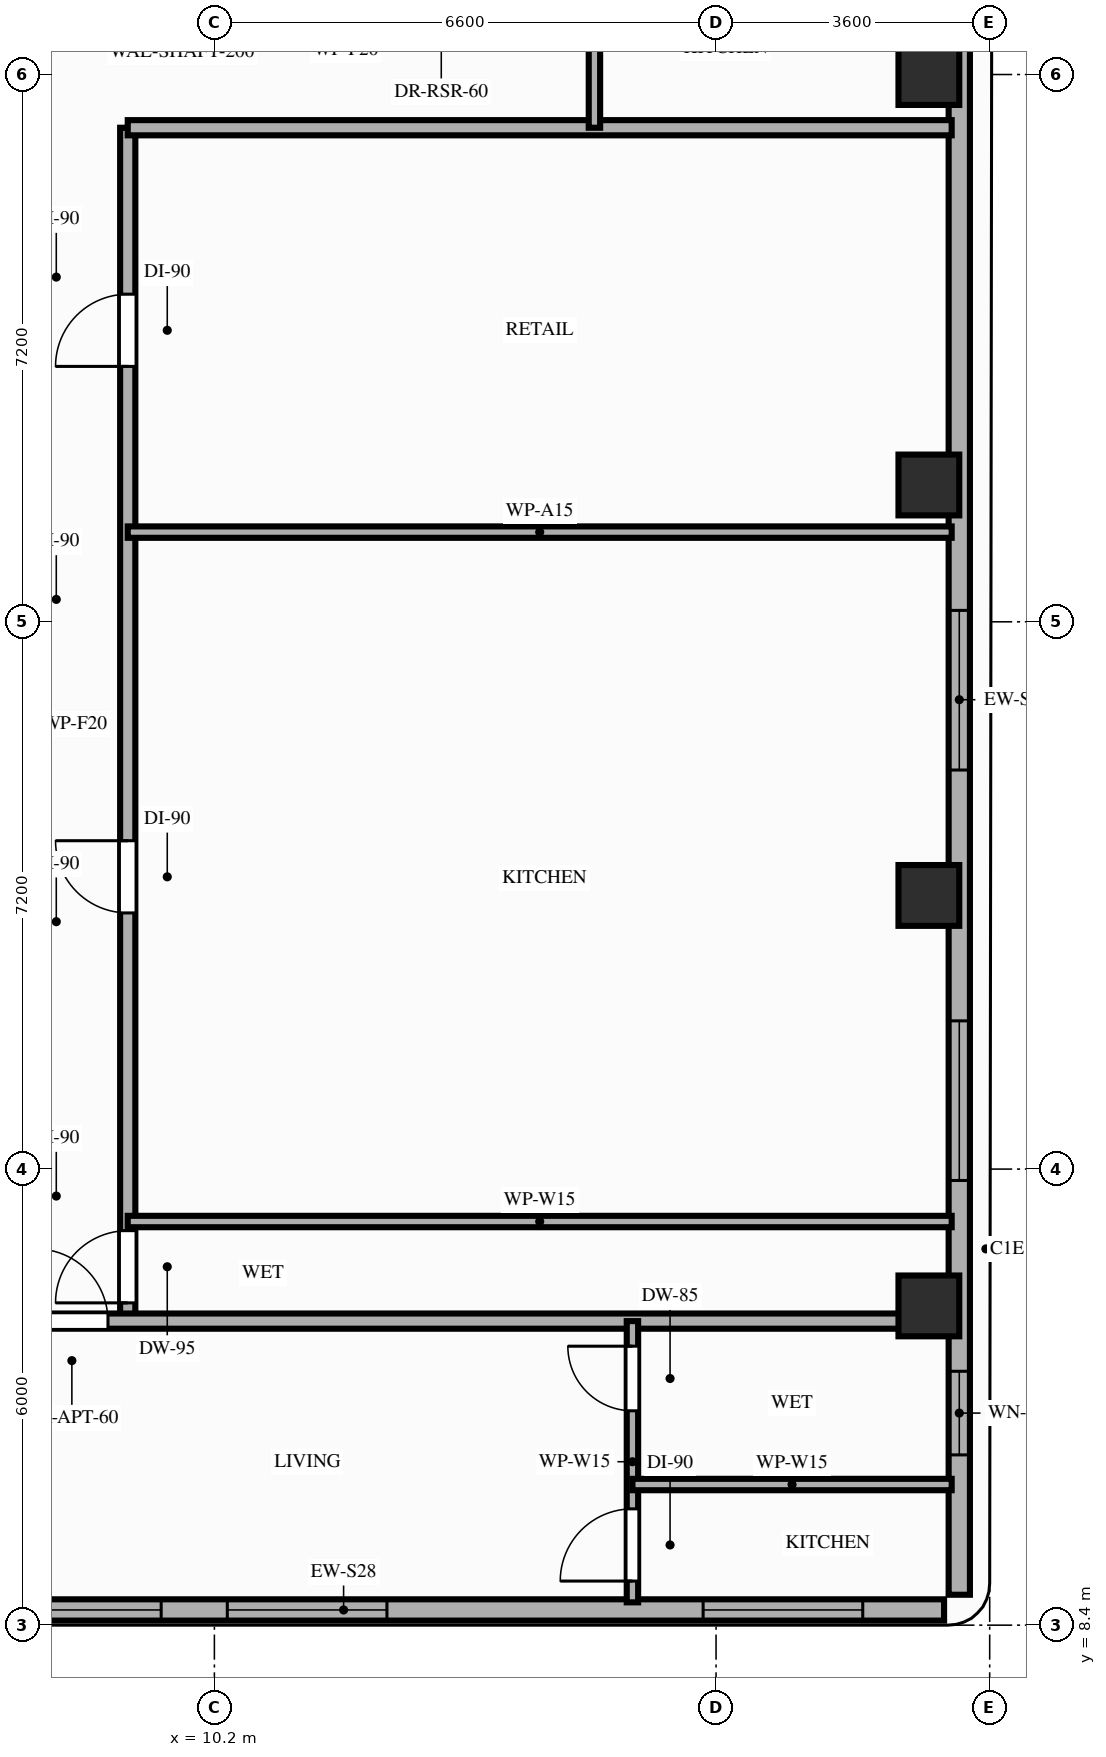
"""IFC4 building model, lengths in metres.
Left out: names, types, materials, properties, quantities, classifications, styles, units other than length and angle.
Written with IfcOpenShell. Run it as: python <this file> out.ifc"""

import sys

from ifc_helpers import new_model, si_unit, direction, frame, frame_2d, origin, origin_2d, place, context, subcontext, project, spatial, rectangle, extrude, element, fill, save


model = new_model("IFC4")
c1 = context("Model", 3, precision=1e-05, world=origin(), true_north=direction((0.0, 1.0)))
c2 = subcontext(c1, "Body", "Model", "MODEL_VIEW")
j1 = project(units=[si_unit("LENGTHUNIT", "METRE"), si_unit("PLANEANGLEUNIT", "RADIAN")], contexts=[c1])
p1 = place(None, origin())
s1 = spatial("IfcSite", under=j1, at=p1, CompositionType="ELEMENT")
p2 = place(p1, origin())
s2 = spatial("IfcBuilding", under=s1, at=p2, CompositionType="ELEMENT")
p3 = place(p2, frame((0.0, 0.0, 218.4)))
s3 = spatial("IfcBuildingStorey", under=s2, at=p3, CompositionType="ELEMENT", Elevation=218.4)
for number, where, z_axis, x_axis in (
    (1, (19.6, 12.6, 0.0), (0.0, 0.0, 1.0), (1.0, 0.0, 0.0)),
    (2, (19.6, 18.0, 0.0), (0.0, 0.0, 1.0), (1.0, 0.0, 0.0)),
    (3, (19.6, 23.4, 0.0), (0.0, 0.0, 1.0), (1.0, 0.0, 0.0)),
    (4, (19.6, 28.8, 0.0), (0.0, 0.0, 1.0), (1.0, 0.0, 0.0)),
):
    element("IfcColumn", number, at=place(p3, frame(where, z_axis=z_axis, x_axis=x_axis)), inside=s3, PredefinedType="COLUMN", context=c2, shape_type="SweptSolid", body=[
        extrude(rectangle(XDim=0.8, YDim=0.8, at=origin_2d()), origin(), (0.0, 0.0, 1.0), 3.2),
    ])
p4 = place(p3, frame((4.0, 8.6, 0.0), z_axis=(0.0, 0.0, 1.0), x_axis=(1.0, 0.0, 0.0)))
e5 = element("IfcWall", 5, at=p4, inside=s3, PredefinedType="STANDARD", context=c2, shape_type="SweptSolid", body=[
    extrude(rectangle(XDim=15.8, YDim=0.28, at=frame_2d((7.9, 0.0))), origin(), (0.0, 0.0, 1.0), 3.02),
])
p5 = place(p4, frame((6.37, 0.0, 0.85)))
e6 = element("IfcOpeningElement", 6, at=p5, cuts=e5, PredefinedType="OPENING", context=c2, shape_type="SweptSolid", body=[
    extrude(rectangle(XDim=2.1, YDim=1.8, at=frame_2d((1.05, 0.9))), frame((0.0, 0.15, 0.0), z_axis=(0.0, -1.0, 0.0), x_axis=(1.0, 0.0, 0.0)), (0.0, 0.0, 1.0), 0.3),
])
p6 = place(p4, frame((12.63, 0.0, 0.85)))
e7 = element("IfcOpeningElement", 7, at=p6, cuts=e5, PredefinedType="OPENING", context=c2, shape_type="SweptSolid", body=[
    extrude(rectangle(XDim=2.1, YDim=1.8, at=frame_2d((1.05, 0.9))), frame((0.0, 0.15, 0.0), z_axis=(0.0, -1.0, 0.0), x_axis=(1.0, 0.0, 0.0)), (0.0, 0.0, 1.0), 0.3),
])
p7 = place(p4, frame((3.4, 0.0, 0.85)))
e8 = element("IfcOpeningElement", 8, at=p7, cuts=e5, PredefinedType="OPENING", context=c2, shape_type="SweptSolid", body=[
    extrude(rectangle(XDim=2.1, YDim=1.8, at=frame_2d((1.05, 0.9))), frame((0.0, 0.15, 0.0), z_axis=(0.0, -1.0, 0.0), x_axis=(1.0, 0.0, 0.0)), (0.0, 0.0, 1.0), 0.3),
])
p8 = place(p3, frame((20.0, 8.8, 0.0), z_axis=(0.0, 0.0, 1.0), x_axis=(0.0, 1.0, 0.0)))
e9 = element("IfcWall", 9, at=p8, inside=s3, PredefinedType="STANDARD", context=c2, shape_type="SweptSolid", body=[
    extrude(rectangle(XDim=23.55, YDim=0.28, at=frame_2d((11.775, 0.0))), origin(), (0.0, 0.0, 1.0), 2.51),
])
p9 = place(p8, frame((1.84, 0.0, 0.85)))
e10 = element("IfcOpeningElement", 10, at=p9, cuts=e9, PredefinedType="OPENING", context=c2, shape_type="SweptSolid", body=[
    extrude(rectangle(XDim=1.1, YDim=1.41, at=frame_2d((0.55, 0.705))), frame((0.0, 0.15, 0.0), z_axis=(0.0, -1.0, 0.0), x_axis=(1.0, 0.0, 0.0)), (0.0, 0.0, 1.0), 0.3),
])
p10 = place(p8, frame((5.45, 0.0, 0.85)))
e11 = element("IfcOpeningElement", 11, at=p10, cuts=e9, PredefinedType="OPENING", context=c2, shape_type="SweptSolid", body=[
    extrude(rectangle(XDim=2.1, YDim=1.41, at=frame_2d((1.05, 0.705))), frame((0.0, 0.15, 0.0), z_axis=(0.0, -1.0, 0.0), x_axis=(1.0, 0.0, 0.0)), (0.0, 0.0, 1.0), 0.3),
])
p11 = place(p8, frame((10.85, 0.0, 0.85)))
e12 = element("IfcOpeningElement", 12, at=p11, cuts=e9, PredefinedType="OPENING", context=c2, shape_type="SweptSolid", body=[
    extrude(rectangle(XDim=2.1, YDim=1.41, at=frame_2d((1.05, 0.705))), frame((0.0, 0.15, 0.0), z_axis=(0.0, -1.0, 0.0), x_axis=(1.0, 0.0, 0.0)), (0.0, 0.0, 1.0), 0.3),
])
p12 = place(p3, frame((9.06, 12.4, 0.0), z_axis=(0.0, 0.0, 1.0), x_axis=(0.0, 1.0, 0.0)))
e13 = element("IfcWall", 13, at=p12, inside=s3, PredefinedType="PARTITIONING", context=c2, shape_type="SweptSolid", body=[
    extrude(rectangle(XDim=15.7, YDim=0.2, at=frame_2d((7.85, 0.0))), origin(), (0.0, 0.0, 1.0), 2.51),
])
p13 = place(p12, frame((0.24, 0.0, 0.0)))
e14 = element("IfcOpeningElement", 14, at=p13, cuts=e13, PredefinedType="OPENING", context=c2, shape_type="SweptSolid", body=[
    extrude(rectangle(XDim=0.95, YDim=2.1, at=frame_2d((0.475, 1.05))), frame((0.0, 0.11, 0.0), z_axis=(0.0, -1.0, 0.0), x_axis=(1.0, 0.0, 0.0)), (0.0, 0.0, 1.0), 0.22),
])
p14 = place(p12, frame((5.37, 0.0, 0.0)))
e15 = element("IfcOpeningElement", 15, at=p14, cuts=e13, PredefinedType="OPENING", context=c2, shape_type="SweptSolid", body=[
    extrude(rectangle(XDim=0.95, YDim=2.15, at=frame_2d((0.475, 1.075))), frame((0.0, 0.11, 0.0), z_axis=(0.0, -1.0, 0.0), x_axis=(1.0, 0.0, 0.0)), (0.0, 0.0, 1.0), 0.22),
])
p15 = place(p12, frame((12.56, 0.0, 0.0)))
e16 = element("IfcOpeningElement", 16, at=p15, cuts=e13, PredefinedType="OPENING", context=c2, shape_type="SweptSolid", body=[
    extrude(rectangle(XDim=0.95, YDim=2.15, at=frame_2d((0.475, 1.075))), frame((0.0, 0.11, 0.0), z_axis=(0.0, -1.0, 0.0), x_axis=(1.0, 0.0, 0.0)), (0.0, 0.0, 1.0), 0.22),
])
p16 = place(p3, frame((3.9, 12.4, 0.0), z_axis=(0.0, 0.0, 1.0), x_axis=(1.0, 0.0, 0.0)))
e17 = element("IfcWall", 17, at=p16, inside=s3, PredefinedType="PARTITIONING", context=c2, shape_type="SweptSolid", body=[
    extrude(rectangle(XDim=16.0, YDim=0.2, at=frame_2d((8.0, 0.0))), origin(), (0.0, 0.0, 1.0), 2.51),
])
p17 = place(p16, frame((3.95, 0.0, 0.0)))
e18 = element("IfcOpeningElement", 18, at=p17, cuts=e17, PredefinedType="OPENING", context=c2, shape_type="SweptSolid", body=[
    extrude(rectangle(XDim=0.95, YDim=2.15, at=frame_2d((0.475, 1.075))), frame((0.0, 0.11, 0.0), z_axis=(0.0, -1.0, 0.0), x_axis=(1.0, 0.0, 0.0)), (0.0, 0.0, 1.0), 0.22),
])
p18 = place(p3, frame((9.06, 28.1, 0.0), z_axis=(0.0, 0.0, 1.0), x_axis=(1.0, 0.0, 0.0)))
e19 = element("IfcWall", 19, at=p18, inside=s3, PredefinedType="PARTITIONING", context=c2, shape_type="SweptSolid", body=[
    extrude(rectangle(XDim=10.84, YDim=0.2, at=frame_2d((5.42, 0.0))), origin(), (0.0, 0.0, 1.0), 2.51),
])
p19 = place(p3, frame((15.2, 28.1, 0.0), z_axis=(0.0, 0.0, 1.0), x_axis=(0.0, 1.0, 0.0)))
e20 = element("IfcWall", 20, at=p19, inside=s3, PredefinedType="PARTITIONING", context=c2, shape_type="SweptSolid", body=[
    extrude(rectangle(XDim=3.05, YDim=0.15, at=frame_2d((1.525, 0.0))), origin(), (0.0, 0.0, 1.0), 2.51),
])
p20 = place(p3, frame((15.7, 8.7, 0.0), z_axis=(0.0, 0.0, 1.0), x_axis=(0.0, 1.0, 0.0)))
e21 = element("IfcWall", 21, at=p20, inside=s3, PredefinedType="PARTITIONING", context=c2, shape_type="SweptSolid", body=[
    extrude(rectangle(XDim=3.7, YDim=0.15, at=frame_2d((1.85, 0.0))), origin(), (0.0, 0.0, 1.0), 2.51),
])
p21 = place(p20, frame((0.28, 0.0, 0.0)))
e22 = element("IfcOpeningElement", 22, at=p21, cuts=e21, PredefinedType="OPENING", context=c2, shape_type="SweptSolid", body=[
    extrude(rectangle(XDim=0.95, YDim=2.15, at=frame_2d((0.475, 1.075))), frame((0.0, 0.085, 0.0), z_axis=(0.0, -1.0, 0.0), x_axis=(1.0, 0.0, 0.0)), (0.0, 0.0, 1.0), 0.17),
])
p22 = place(p20, frame((2.52, 0.0, 0.0)))
e23 = element("IfcOpeningElement", 23, at=p22, cuts=e21, PredefinedType="OPENING", context=c2, shape_type="SweptSolid", body=[
    extrude(rectangle(XDim=0.85, YDim=2.1, at=frame_2d((0.425, 1.05))), frame((0.0, 0.085, 0.0), z_axis=(0.0, -1.0, 0.0), x_axis=(1.0, 0.0, 0.0)), (0.0, 0.0, 1.0), 0.17),
])
p23 = place(p3, frame((15.7, 10.25, 0.0), z_axis=(0.0, 0.0, 1.0), x_axis=(1.0, 0.0, 0.0)))
e24 = element("IfcWall", 24, at=p23, inside=s3, PredefinedType="PARTITIONING", context=c2, shape_type="SweptSolid", body=[
    extrude(rectangle(XDim=4.2, YDim=0.15, at=frame_2d((2.1, 0.0))), origin(), (0.0, 0.0, 1.0), 3.02),
])
for number, where, z_axis, x_axis in (
    (25, (9.06, 13.71, 0.0), (0.0, 0.0, 1.0), (1.0, 0.0, 0.0)),
    (26, (9.06, 22.78, 0.0), (0.0, 0.0, 1.0), (1.0, 0.0, 0.0)),
):
    element("IfcWall", number, at=place(p3, frame(where, z_axis=z_axis, x_axis=x_axis)), inside=s3, PredefinedType="PARTITIONING", context=c2, shape_type="SweptSolid", body=[
        extrude(rectangle(XDim=10.84, YDim=0.15, at=frame_2d((5.42, 0.0))), origin(), (0.0, 0.0, 1.0), 2.51),
    ])
p24 = place(p5, origin())
e27 = element("IfcWindow", 27, at=p24, inside=s3, PartitioningType="SINGLE_PANEL", PredefinedType="WINDOW", context=c2, shape_type="SweptSolid", body=[
    extrude(rectangle(XDim=2.1, YDim=1.8, at=frame_2d((1.05, 0.9))), frame((0.0, 0.03, 0.0), z_axis=(0.0, -1.0, 0.0), x_axis=(1.0, 0.0, 0.0)), (0.0, 0.0, 1.0), 0.06),
])
fill(e6, e27)
p25 = place(p6, origin())
e28 = element("IfcWindow", 28, at=p25, inside=s3, PartitioningType="SINGLE_PANEL", PredefinedType="WINDOW", context=c2, shape_type="SweptSolid", body=[
    extrude(rectangle(XDim=2.1, YDim=1.8, at=frame_2d((1.05, 0.9))), frame((0.0, 0.03, 0.0), z_axis=(0.0, -1.0, 0.0), x_axis=(1.0, 0.0, 0.0)), (0.0, 0.0, 1.0), 0.06),
])
fill(e7, e28)
p26 = place(p9, origin())
e29 = element("IfcWindow", 29, at=p26, inside=s3, PartitioningType="SINGLE_PANEL", PredefinedType="WINDOW", context=c2, shape_type="SweptSolid", body=[
    extrude(rectangle(XDim=1.1, YDim=1.41, at=frame_2d((0.55, 0.705))), frame((0.0, 0.03, 0.0), z_axis=(0.0, -1.0, 0.0), x_axis=(1.0, 0.0, 0.0)), (0.0, 0.0, 1.0), 0.06),
])
fill(e10, e29)
p27 = place(p10, origin())
e30 = element("IfcWindow", 30, at=p27, inside=s3, PartitioningType="SINGLE_PANEL", PredefinedType="WINDOW", context=c2, shape_type="SweptSolid", body=[
    extrude(rectangle(XDim=2.1, YDim=1.41, at=frame_2d((1.05, 0.705))), frame((0.0, 0.03, 0.0), z_axis=(0.0, -1.0, 0.0), x_axis=(1.0, 0.0, 0.0)), (0.0, 0.0, 1.0), 0.06),
])
fill(e11, e30)
p28 = place(p11, origin())
e31 = element("IfcWindow", 31, at=p28, inside=s3, PartitioningType="SINGLE_PANEL", PredefinedType="WINDOW", context=c2, shape_type="SweptSolid", body=[
    extrude(rectangle(XDim=2.1, YDim=1.41, at=frame_2d((1.05, 0.705))), frame((0.0, 0.03, 0.0), z_axis=(0.0, -1.0, 0.0), x_axis=(1.0, 0.0, 0.0)), (0.0, 0.0, 1.0), 0.06),
])
fill(e12, e31)
p29 = place(p7, origin())
e32 = element("IfcWindow", 32, at=p29, inside=s3, PartitioningType="SINGLE_PANEL", PredefinedType="WINDOW", context=c2, shape_type="SweptSolid", body=[
    extrude(rectangle(XDim=2.1, YDim=1.8, at=frame_2d((1.05, 0.9))), frame((0.0, 0.03, 0.0), z_axis=(0.0, -1.0, 0.0), x_axis=(1.0, 0.0, 0.0)), (0.0, 0.0, 1.0), 0.06),
])
fill(e8, e32)
p30 = place(p17, origin())
e33 = element("IfcDoor", 33, at=p30, inside=s3, OperationType="SINGLE_SWING_LEFT", PredefinedType="DOOR", context=c2, shape_type="SweptSolid", body=[
    extrude(rectangle(XDim=0.95, YDim=2.15, at=frame_2d((0.475, 1.075))), frame((0.0, 0.025, 0.0), z_axis=(0.0, -1.0, 0.0), x_axis=(1.0, 0.0, 0.0)), (0.0, 0.0, 1.0), 0.05),
])
fill(e18, e33)
p31 = place(p21, origin())
e34 = element("IfcDoor", 34, at=p31, inside=s3, OperationType="SINGLE_SWING_LEFT", PredefinedType="DOOR", context=c2, shape_type="SweptSolid", body=[
    extrude(rectangle(XDim=0.95, YDim=2.15, at=frame_2d((0.475, 1.075))), frame((0.0, 0.025, 0.0), z_axis=(0.0, -1.0, 0.0), x_axis=(1.0, 0.0, 0.0)), (0.0, 0.0, 1.0), 0.05),
])
fill(e22, e34)
p32 = place(p22, origin())
e35 = element("IfcDoor", 35, at=p32, inside=s3, OperationType="SINGLE_SWING_RIGHT", PredefinedType="DOOR", context=c2, shape_type="SweptSolid", body=[
    extrude(rectangle(XDim=0.85, YDim=2.1, at=frame_2d((0.425, 1.05))), frame((0.0, 0.025, 0.0), z_axis=(0.0, -1.0, 0.0), x_axis=(1.0, 0.0, 0.0)), (0.0, 0.0, 1.0), 0.05),
])
fill(e23, e35)
p33 = place(p13, origin())
e36 = element("IfcDoor", 36, at=p33, inside=s3, OperationType="SINGLE_SWING_LEFT", PredefinedType="DOOR", context=c2, shape_type="SweptSolid", body=[
    extrude(rectangle(XDim=0.95, YDim=2.1, at=frame_2d((0.475, 1.05))), frame((0.0, 0.025, 0.0), z_axis=(0.0, -1.0, 0.0), x_axis=(1.0, 0.0, 0.0)), (0.0, 0.0, 1.0), 0.05),
])
fill(e14, e36)
p34 = place(p14, origin())
e37 = element("IfcDoor", 37, at=p34, inside=s3, OperationType="SINGLE_SWING_RIGHT", PredefinedType="DOOR", context=c2, shape_type="SweptSolid", body=[
    extrude(rectangle(XDim=0.95, YDim=2.15, at=frame_2d((0.475, 1.075))), frame((0.0, 0.025, 0.0), z_axis=(0.0, -1.0, 0.0), x_axis=(1.0, 0.0, 0.0)), (0.0, 0.0, 1.0), 0.05),
])
fill(e15, e37)
p35 = place(p15, origin())
e38 = element("IfcDoor", 38, at=p35, inside=s3, OperationType="SINGLE_SWING_LEFT", PredefinedType="DOOR", context=c2, shape_type="SweptSolid", body=[
    extrude(rectangle(XDim=0.95, YDim=2.15, at=frame_2d((0.475, 1.075))), frame((0.0, 0.025, 0.0), z_axis=(0.0, -1.0, 0.0), x_axis=(1.0, 0.0, 0.0)), (0.0, 0.0, 1.0), 0.05),
])
fill(e16, e38)
save(model, sys.argv[1])
